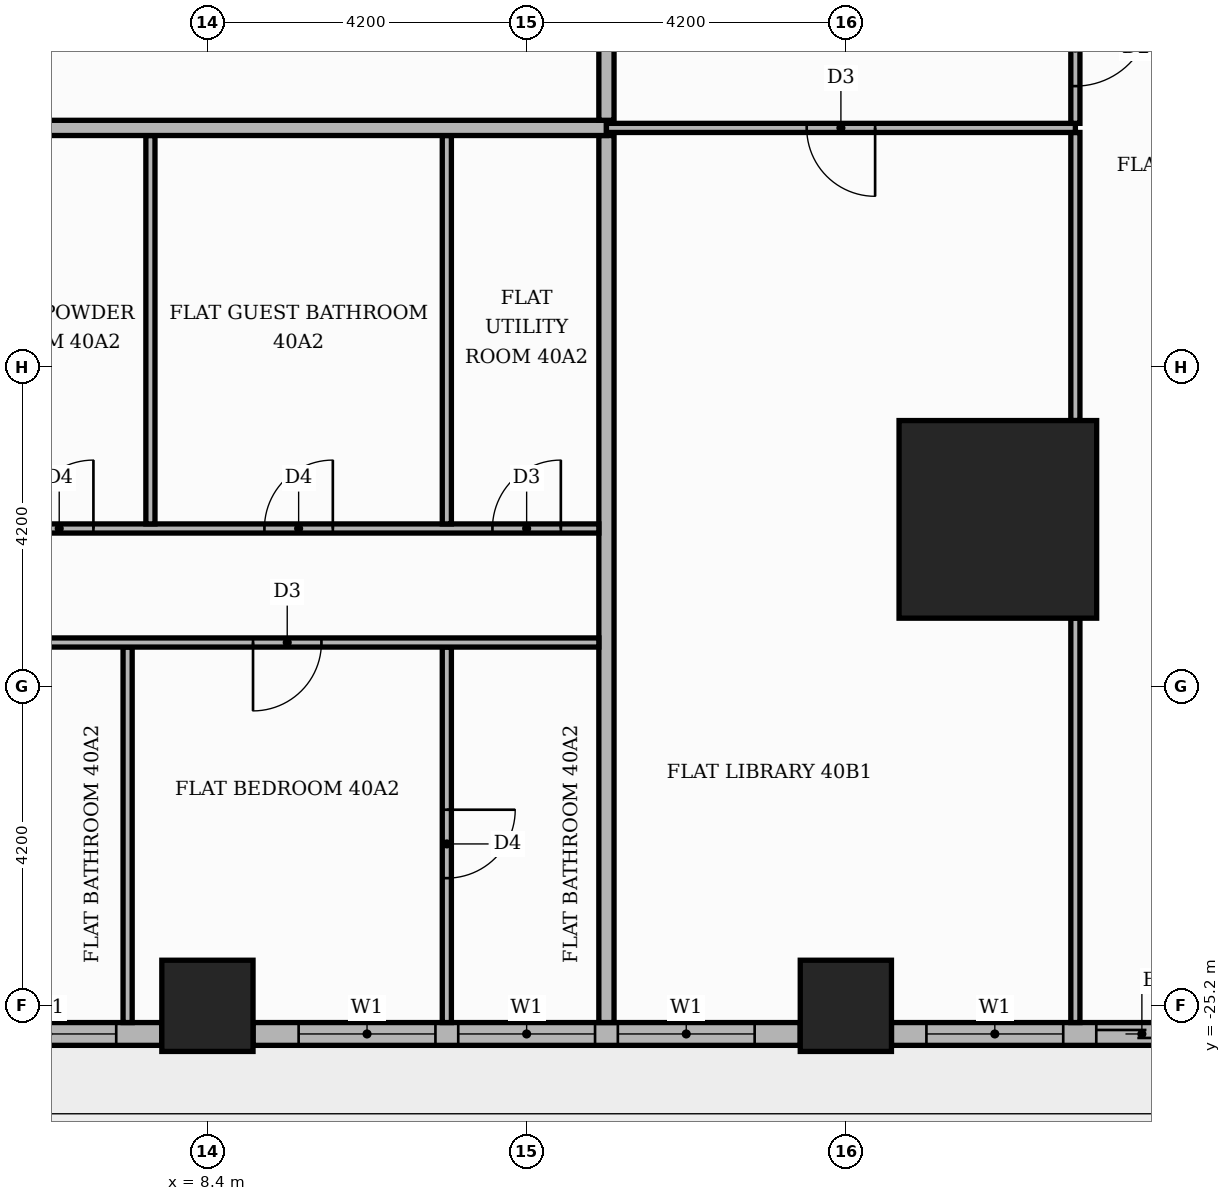
"""IFC4 building model, lengths in metres.
Left out: names, types, materials, properties, quantities, classifications, styles, units other than length and angle.
Written with IfcOpenShell. Run it as: python <this file> out.ifc"""

import sys

from ifc_helpers import new_model, si_unit, direction, frame, frame_2d, origin, origin_2d, place, context, subcontext, project, spatial, rectangle, extrude, element, fill, save


model = new_model("IFC4")
c1 = context("Model", 3, precision=1e-05, world=origin(), true_north=direction((0.0, 1.0)))
c2 = subcontext(c1, "Body", "Model", "MODEL_VIEW")
j1 = project(units=[si_unit("LENGTHUNIT", "METRE"), si_unit("PLANEANGLEUNIT", "RADIAN")], contexts=[c1])
p1 = place(None, origin())
s1 = spatial("IfcSite", under=j1, at=p1, CompositionType="ELEMENT")
p2 = place(p1, origin())
s2 = spatial("IfcBuilding", under=s1, at=p2, CompositionType="ELEMENT")
p3 = place(p2, frame((0.0, 0.0, 168.9)))
s3 = spatial("IfcBuildingStorey", under=s2, at=p3, CompositionType="ELEMENT", Elevation=168.9)
p4 = place(p3, frame((18.8, -18.8, 0.0), z_axis=(0.0, 0.0, 1.0), x_axis=(1.0, 0.0, 0.0)))
e1 = element("IfcColumn", 1, at=p4, inside=s3, PredefinedType="COLUMN", context=c2, shape_type="SweptSolid", body=[
    extrude(rectangle(XDim=2.6, YDim=2.6, at=origin_2d()), origin(), (0.0, 0.0, 1.0), 3.9),
])
for number, where, z_axis, x_axis in (
    (2, (8.4, -25.2, 0.0), (0.0, 0.0, 1.0), (1.0, 0.0, 0.0)),
    (3, (16.8, -25.2, 0.0), (0.0, 0.0, 1.0), (1.0, 0.0, 0.0)),
):
    element("IfcColumn", number, at=place(p3, frame(where, z_axis=z_axis, x_axis=x_axis)), inside=s3, PredefinedType="COLUMN", context=c2, shape_type="SweptSolid", body=[
        extrude(rectangle(XDim=1.2, YDim=1.2, at=origin_2d()), origin(), (0.0, 0.0, 1.0), 3.9),
    ])
p5 = place(p3, frame((0.6, -25.57, 0.0), z_axis=(0.0, 0.0, 1.0), x_axis=(1.0, 0.0, 0.0)))
e4 = element("IfcWall", 4, at=p5, inside=s3, PredefinedType="STANDARD", context=c2, shape_type="SweptSolid", body=[
    extrude(rectangle(XDim=7.2, YDim=0.3, at=frame_2d((3.6, 0.0))), origin(), (0.0, 0.0, 1.0), 3.48),
])
p6 = place(p5, frame((0.6, 0.0, 0.0)))
e5 = element("IfcOpeningElement", 5, at=p6, cuts=e4, PredefinedType="OPENING", context=c2, shape_type="SweptSolid", body=[
    extrude(rectangle(XDim=1.8, YDim=2.4, at=frame_2d((0.9, 1.2))), frame((0.0, 0.16, 0.0), z_axis=(0.0, -1.0, 0.0), x_axis=(1.0, 0.0, 0.0)), (0.0, 0.0, 1.0), 0.32),
])
p7 = place(p5, frame((2.7, 0.0, 0.9)))
e6 = element("IfcOpeningElement", 6, at=p7, cuts=e4, PredefinedType="OPENING", context=c2, shape_type="SweptSolid", body=[
    extrude(rectangle(XDim=1.8, YDim=2.1, at=frame_2d((0.9, 1.05))), frame((0.0, 0.16, 0.0), z_axis=(0.0, -1.0, 0.0), x_axis=(1.0, 0.0, 0.0)), (0.0, 0.0, 1.0), 0.32),
])
p8 = place(p5, frame((4.8, 0.0, 0.9)))
e7 = element("IfcOpeningElement", 7, at=p8, cuts=e4, PredefinedType="OPENING", context=c2, shape_type="SweptSolid", body=[
    extrude(rectangle(XDim=1.8, YDim=2.1, at=frame_2d((0.9, 1.05))), frame((0.0, 0.16, 0.0), z_axis=(0.0, -1.0, 0.0), x_axis=(1.0, 0.0, 0.0)), (0.0, 0.0, 1.0), 0.32),
])
p9 = place(p3, frame((9.0, -25.57, 0.0), z_axis=(0.0, 0.0, 1.0), x_axis=(1.0, 0.0, 0.0)))
e8 = element("IfcWall", 8, at=p9, inside=s3, PredefinedType="STANDARD", context=c2, shape_type="SweptSolid", body=[
    extrude(rectangle(XDim=7.2, YDim=0.3, at=frame_2d((3.6, 0.0))), origin(), (0.0, 0.0, 1.0), 3.48),
])
p10 = place(p9, frame((0.6, 0.0, 0.9)))
e9 = element("IfcOpeningElement", 9, at=p10, cuts=e8, PredefinedType="OPENING", context=c2, shape_type="SweptSolid", body=[
    extrude(rectangle(XDim=1.8, YDim=2.1, at=frame_2d((0.9, 1.05))), frame((0.0, 0.16, 0.0), z_axis=(0.0, -1.0, 0.0), x_axis=(1.0, 0.0, 0.0)), (0.0, 0.0, 1.0), 0.32),
])
p11 = place(p9, frame((2.7, 0.0, 0.9)))
e10 = element("IfcOpeningElement", 10, at=p11, cuts=e8, PredefinedType="OPENING", context=c2, shape_type="SweptSolid", body=[
    extrude(rectangle(XDim=1.8, YDim=2.1, at=frame_2d((0.9, 1.05))), frame((0.0, 0.16, 0.0), z_axis=(0.0, -1.0, 0.0), x_axis=(1.0, 0.0, 0.0)), (0.0, 0.0, 1.0), 0.32),
])
p12 = place(p9, frame((4.8, 0.0, 0.9)))
e11 = element("IfcOpeningElement", 11, at=p12, cuts=e8, PredefinedType="OPENING", context=c2, shape_type="SweptSolid", body=[
    extrude(rectangle(XDim=1.8, YDim=2.1, at=frame_2d((0.9, 1.05))), frame((0.0, 0.16, 0.0), z_axis=(0.0, -1.0, 0.0), x_axis=(1.0, 0.0, 0.0)), (0.0, 0.0, 1.0), 0.32),
])
p13 = place(p3, frame((17.4, -25.57, 0.0), z_axis=(0.0, 0.0, 1.0), x_axis=(1.0, 0.0, 0.0)))
e12 = element("IfcWall", 12, at=p13, inside=s3, PredefinedType="STANDARD", context=c2, shape_type="SweptSolid", body=[
    extrude(rectangle(XDim=4.32, YDim=0.3, at=frame_2d((2.16, 0.0))), origin(), (0.0, 0.0, 1.0), 3.48),
])
p14 = place(p13, frame((2.695, 0.0, 0.0)))
e13 = element("IfcOpeningElement", 13, at=p14, cuts=e12, PredefinedType="OPENING", context=c2, shape_type="SweptSolid", body=[
    extrude(rectangle(XDim=1.2, YDim=2.4, at=frame_2d((0.6, 1.2))), frame((0.0, 0.16, 0.0), z_axis=(0.0, -1.0, 0.0), x_axis=(1.0, 0.0, 0.0)), (0.0, 0.0, 1.0), 0.32),
])
p15 = place(p13, frame((0.46, 0.0, 0.9)))
e14 = element("IfcOpeningElement", 14, at=p15, cuts=e12, PredefinedType="OPENING", context=c2, shape_type="SweptSolid", body=[
    extrude(rectangle(XDim=1.8, YDim=2.1, at=frame_2d((0.9, 1.05))), frame((0.0, 0.16, 0.0), z_axis=(0.0, -1.0, 0.0), x_axis=(1.0, 0.0, 0.0)), (0.0, 0.0, 1.0), 0.32),
])
p16 = place(p3, frame((7.35, -25.42, 0.0), z_axis=(0.0, 0.0, 1.0), x_axis=(0.0, 1.0, 0.0)))
e15 = element("IfcWall", 15, at=p16, inside=s3, PredefinedType="PARTITIONING", context=c2, shape_type="SweptSolid", body=[
    extrude(rectangle(XDim=4.94, YDim=0.12, at=frame_2d((2.47, 0.0))), origin(), (0.0, 0.0, 1.0), 3.48),
])
p17 = place(p3, frame((11.55, -25.42, 0.0), z_axis=(0.0, 0.0, 1.0), x_axis=(0.0, 1.0, 0.0)))
e16 = element("IfcWall", 16, at=p17, inside=s3, PredefinedType="PARTITIONING", context=c2, shape_type="SweptSolid", body=[
    extrude(rectangle(XDim=4.94, YDim=0.12, at=frame_2d((2.47, 0.0))), origin(), (0.0, 0.0, 1.0), 3.48),
])
p18 = place(p17, frame((1.9, 0.0, 0.0)))
e17 = element("IfcOpeningElement", 17, at=p18, cuts=e16, PredefinedType="OPENING", context=c2, shape_type="SweptSolid", body=[
    extrude(rectangle(XDim=0.9, YDim=2.1, at=frame_2d((0.45, 1.05))), frame((0.0, 0.07, 0.0), z_axis=(0.0, -1.0, 0.0), x_axis=(1.0, 0.0, 0.0)), (0.0, 0.0, 1.0), 0.14),
])
p19 = place(p3, frame((13.65, -25.42, 0.0), z_axis=(0.0, 0.0, 1.0), x_axis=(0.0, 1.0, 0.0)))
e18 = element("IfcWall", 18, at=p19, inside=s3, PredefinedType="PARTITIONING", context=c2, shape_type="SweptSolid", body=[
    extrude(rectangle(XDim=11.67, YDim=0.2, at=frame_2d((5.835, 0.0))), origin(), (0.0, 0.0, 1.0), 3.48),
])
p20 = place(p3, frame((19.82, -25.42, 0.0), z_axis=(0.0, 0.0, 1.0), x_axis=(0.0, 1.0, 0.0)))
e19 = element("IfcWall", 19, at=p20, inside=s3, PredefinedType="PARTITIONING", context=c2, shape_type="SweptSolid", body=[
    extrude(rectangle(XDim=5.32, YDim=0.12, at=frame_2d((2.66, 0.0))), origin(), (0.0, 0.0, 1.0), 3.48),
])
p21 = place(p3, frame((-5.15, -20.42, 0.0), z_axis=(0.0, 0.0, 1.0), x_axis=(1.0, 0.0, 0.0)))
e20 = element("IfcWall", 20, at=p21, inside=s3, PredefinedType="PARTITIONING", context=c2, shape_type="SweptSolid", body=[
    extrude(rectangle(XDim=18.7, YDim=0.12, at=frame_2d((9.35, 0.0))), origin(), (0.0, 0.0, 1.0), 3.48),
])
p22 = place(p21, frame((1.5, 0.0, 0.0)))
e21 = element("IfcOpeningElement", 21, at=p22, cuts=e20, PredefinedType="OPENING", context=c2, shape_type="SweptSolid", body=[
    extrude(rectangle(XDim=1.0, YDim=2.1, at=frame_2d((0.5, 1.05))), frame((0.0, 0.07, 0.0), z_axis=(0.0, -1.0, 0.0), x_axis=(1.0, 0.0, 0.0)), (0.0, 0.0, 1.0), 0.14),
])
p23 = place(p21, frame((5.75, 0.0, 0.0)))
e22 = element("IfcOpeningElement", 22, at=p23, cuts=e20, PredefinedType="OPENING", context=c2, shape_type="SweptSolid", body=[
    extrude(rectangle(XDim=0.9, YDim=2.1, at=frame_2d((0.45, 1.05))), frame((0.0, 0.07, 0.0), z_axis=(0.0, -1.0, 0.0), x_axis=(1.0, 0.0, 0.0)), (0.0, 0.0, 1.0), 0.14),
])
p24 = place(p21, frame((14.15, 0.0, 0.0)))
e23 = element("IfcOpeningElement", 23, at=p24, cuts=e20, PredefinedType="OPENING", context=c2, shape_type="SweptSolid", body=[
    extrude(rectangle(XDim=0.9, YDim=2.1, at=frame_2d((0.45, 1.05))), frame((0.0, 0.07, 0.0), z_axis=(0.0, -1.0, 0.0), x_axis=(1.0, 0.0, 0.0)), (0.0, 0.0, 1.0), 0.14),
])
p25 = place(p3, frame((-1.05, -18.92, 0.0), z_axis=(0.0, 0.0, 1.0), x_axis=(1.0, 0.0, 0.0)))
e24 = element("IfcWall", 24, at=p25, inside=s3, PredefinedType="PARTITIONING", context=c2, shape_type="SweptSolid", body=[
    extrude(rectangle(XDim=14.6, YDim=0.12, at=frame_2d((7.3, 0.0))), origin(), (0.0, 0.0, 1.0), 3.48),
])
p26 = place(p25, frame((2.7, 0.0, 0.0)))
e25 = element("IfcOpeningElement", 25, at=p26, cuts=e24, PredefinedType="OPENING", context=c2, shape_type="SweptSolid", body=[
    extrude(rectangle(XDim=0.9, YDim=2.1, at=frame_2d((0.45, 1.05))), frame((0.0, 0.07, 0.0), z_axis=(0.0, -1.0, 0.0), x_axis=(1.0, 0.0, 0.0)), (0.0, 0.0, 1.0), 0.14),
])
p27 = place(p25, frame((7.05, 0.0, 0.0)))
e26 = element("IfcOpeningElement", 26, at=p27, cuts=e24, PredefinedType="OPENING", context=c2, shape_type="SweptSolid", body=[
    extrude(rectangle(XDim=0.9, YDim=2.1, at=frame_2d((0.45, 1.05))), frame((0.0, 0.07, 0.0), z_axis=(0.0, -1.0, 0.0), x_axis=(1.0, 0.0, 0.0)), (0.0, 0.0, 1.0), 0.14),
])
p28 = place(p25, frame((10.2, 0.0, 0.0)))
e27 = element("IfcOpeningElement", 27, at=p28, cuts=e24, PredefinedType="OPENING", context=c2, shape_type="SweptSolid", body=[
    extrude(rectangle(XDim=0.9, YDim=2.1, at=frame_2d((0.45, 1.05))), frame((0.0, 0.07, 0.0), z_axis=(0.0, -1.0, 0.0), x_axis=(1.0, 0.0, 0.0)), (0.0, 0.0, 1.0), 0.14),
])
p29 = place(p25, frame((13.2, 0.0, 0.0)))
e28 = element("IfcOpeningElement", 28, at=p29, cuts=e24, PredefinedType="OPENING", context=c2, shape_type="SweptSolid", body=[
    extrude(rectangle(XDim=0.9, YDim=2.1, at=frame_2d((0.45, 1.05))), frame((0.0, 0.07, 0.0), z_axis=(0.0, -1.0, 0.0), x_axis=(1.0, 0.0, 0.0)), (0.0, 0.0, 1.0), 0.14),
])
for number, where, z_axis, x_axis in (
    (29, (7.65, -18.86, 0.0), (0.0, 0.0, 1.0), (0.0, 1.0, 0.0)),
    (30, (11.55, -18.86, 0.0), (0.0, 0.0, 1.0), (0.0, 1.0, 0.0)),
):
    element("IfcWall", number, at=place(p3, frame(where, z_axis=z_axis, x_axis=x_axis)), inside=s3, PredefinedType="PARTITIONING", context=c2, shape_type="SweptSolid", body=[
        extrude(rectangle(XDim=5.11, YDim=0.12, at=frame_2d((2.555, 0.0))), origin(), (0.0, 0.0, 1.0), 3.48),
    ])
p30 = place(p3, frame((19.82, -17.5, 0.0), z_axis=(0.0, 0.0, 1.0), x_axis=(0.0, 1.0, 0.0)))
e31 = element("IfcWall", 31, at=p30, inside=s3, PredefinedType="PARTITIONING", context=c2, shape_type="SweptSolid", body=[
    extrude(rectangle(XDim=3.79, YDim=0.12, at=frame_2d((1.895, 0.0))), origin(), (0.0, 0.0, 1.0), 3.48),
])
p31 = place(p3, frame((-25.42, -13.65, 0.0), z_axis=(0.0, 0.0, 1.0), x_axis=(1.0, 0.0, 0.0)))
e32 = element("IfcWall", 32, at=p31, inside=s3, PredefinedType="PARTITIONING", context=c2, shape_type="SweptSolid", body=[
    extrude(rectangle(XDim=39.07, YDim=0.2, at=frame_2d((19.535, 0.0))), origin(), (0.0, 0.0, 1.0), 3.48),
])
p32 = place(p31, frame((13.32, 0.0, 0.0)))
e33 = element("IfcOpeningElement", 33, at=p32, cuts=e32, PredefinedType="OPENING", context=c2, shape_type="SweptSolid", body=[
    extrude(rectangle(XDim=1.1, YDim=2.4, at=frame_2d((0.55, 1.2))), frame((0.0, 0.11, 0.0), z_axis=(0.0, -1.0, 0.0), x_axis=(1.0, 0.0, 0.0)), (0.0, 0.0, 1.0), 0.22),
])
p33 = place(p31, frame((21.72, 0.0, 0.0)))
e34 = element("IfcOpeningElement", 34, at=p33, cuts=e32, PredefinedType="OPENING", context=c2, shape_type="SweptSolid", body=[
    extrude(rectangle(XDim=1.1, YDim=2.4, at=frame_2d((0.55, 1.2))), frame((0.0, 0.11, 0.0), z_axis=(0.0, -1.0, 0.0), x_axis=(1.0, 0.0, 0.0)), (0.0, 0.0, 1.0), 0.22),
])
p34 = place(p3, frame((13.65, -13.65, 0.0), z_axis=(0.0, 0.0, 1.0), x_axis=(1.0, 0.0, 0.0)))
e35 = element("IfcWall", 35, at=p34, inside=s3, PredefinedType="PARTITIONING", context=c2, shape_type="SweptSolid", body=[
    extrude(rectangle(XDim=6.17, YDim=0.12, at=frame_2d((3.085, 0.0))), origin(), (0.0, 0.0, 1.0), 3.48),
])
p35 = place(p34, frame((2.635, 0.0, 0.0)))
e36 = element("IfcOpeningElement", 36, at=p35, cuts=e35, PredefinedType="OPENING", context=c2, shape_type="SweptSolid", body=[
    extrude(rectangle(XDim=0.9, YDim=2.1, at=frame_2d((0.45, 1.05))), frame((0.0, 0.07, 0.0), z_axis=(0.0, -1.0, 0.0), x_axis=(1.0, 0.0, 0.0)), (0.0, 0.0, 1.0), 0.14),
])
p36 = place(p3, frame((19.82, -13.59, 0.0), z_axis=(0.0, 0.0, 1.0), x_axis=(0.0, 1.0, 0.0)))
e37 = element("IfcWall", 37, at=p36, inside=s3, PredefinedType="PARTITIONING", context=c2, shape_type="SweptSolid", body=[
    extrude(rectangle(XDim=1.98, YDim=0.12, at=frame_2d((0.99, 0.0))), origin(), (0.0, 0.0, 1.0), 3.48),
])
p37 = place(p36, frame((0.49, 0.0, 0.0)))
e38 = element("IfcOpeningElement", 38, at=p37, cuts=e37, PredefinedType="OPENING", context=c2, shape_type="SweptSolid", body=[
    extrude(rectangle(XDim=1.0, YDim=2.1, at=frame_2d((0.5, 1.05))), frame((0.0, 0.07, 0.0), z_axis=(0.0, -1.0, 0.0), x_axis=(1.0, 0.0, 0.0)), (0.0, 0.0, 1.0), 0.14),
])
p38 = place(p3, frame((13.65, -13.55, 0.0), z_axis=(0.0, 0.0, 1.0), x_axis=(0.0, 1.0, 0.0)))
e39 = element("IfcWall", 39, at=p38, inside=s3, PredefinedType="PARTITIONING", context=c2, shape_type="SweptSolid", body=[
    extrude(rectangle(XDim=2.45, YDim=0.2, at=frame_2d((1.225, 0.0))), origin(), (0.0, 0.0, 1.0), 3.48),
])
p39 = place(p8, origin())
e40 = element("IfcWindow", 40, at=p39, inside=s3, PartitioningType="SINGLE_PANEL", PredefinedType="WINDOW", context=c2, shape_type="SweptSolid", body=[
    extrude(rectangle(XDim=1.8, YDim=2.1, at=frame_2d((0.9, 1.05))), frame((0.0, 0.03, 0.0), z_axis=(0.0, -1.0, 0.0), x_axis=(1.0, 0.0, 0.0)), (0.0, 0.0, 1.0), 0.06),
])
fill(e7, e40)
p40 = place(p10, origin())
e41 = element("IfcWindow", 41, at=p40, inside=s3, PartitioningType="SINGLE_PANEL", PredefinedType="WINDOW", context=c2, shape_type="SweptSolid", body=[
    extrude(rectangle(XDim=1.8, YDim=2.1, at=frame_2d((0.9, 1.05))), frame((0.0, 0.03, 0.0), z_axis=(0.0, -1.0, 0.0), x_axis=(1.0, 0.0, 0.0)), (0.0, 0.0, 1.0), 0.06),
])
fill(e9, e41)
p41 = place(p11, origin())
e42 = element("IfcWindow", 42, at=p41, inside=s3, PartitioningType="SINGLE_PANEL", PredefinedType="WINDOW", context=c2, shape_type="SweptSolid", body=[
    extrude(rectangle(XDim=1.8, YDim=2.1, at=frame_2d((0.9, 1.05))), frame((0.0, 0.03, 0.0), z_axis=(0.0, -1.0, 0.0), x_axis=(1.0, 0.0, 0.0)), (0.0, 0.0, 1.0), 0.06),
])
fill(e10, e42)
p42 = place(p12, origin())
e43 = element("IfcWindow", 43, at=p42, inside=s3, PartitioningType="SINGLE_PANEL", PredefinedType="WINDOW", context=c2, shape_type="SweptSolid", body=[
    extrude(rectangle(XDim=1.8, YDim=2.1, at=frame_2d((0.9, 1.05))), frame((0.0, 0.03, 0.0), z_axis=(0.0, -1.0, 0.0), x_axis=(1.0, 0.0, 0.0)), (0.0, 0.0, 1.0), 0.06),
])
fill(e11, e43)
p43 = place(p14, origin())
e44 = element("IfcDoor", 44, at=p43, inside=s3, OperationType="SLIDING_TO_LEFT", PredefinedType="DOOR", context=c2, shape_type="SweptSolid", body=[
    extrude(rectangle(XDim=1.2, YDim=2.4, at=frame_2d((0.6, 1.2))), frame((0.0, 0.025, 0.0), z_axis=(0.0, -1.0, 0.0), x_axis=(1.0, 0.0, 0.0)), (0.0, 0.0, 1.0), 0.05),
])
fill(e13, e44)
p44 = place(p15, origin())
e45 = element("IfcWindow", 45, at=p44, inside=s3, PartitioningType="SINGLE_PANEL", PredefinedType="WINDOW", context=c2, shape_type="SweptSolid", body=[
    extrude(rectangle(XDim=1.8, YDim=2.1, at=frame_2d((0.9, 1.05))), frame((0.0, 0.03, 0.0), z_axis=(0.0, -1.0, 0.0), x_axis=(1.0, 0.0, 0.0)), (0.0, 0.0, 1.0), 0.06),
])
fill(e14, e45)
p45 = place(p27, origin())
e46 = element("IfcDoor", 46, at=p45, inside=s3, OperationType="SINGLE_SWING_RIGHT", PredefinedType="DOOR", context=c2, shape_type="SweptSolid", body=[
    extrude(rectangle(XDim=0.9, YDim=2.1, at=frame_2d((0.45, 1.05))), frame((0.0, 0.025, 0.0), z_axis=(0.0, -1.0, 0.0), x_axis=(1.0, 0.0, 0.0)), (0.0, 0.0, 1.0), 0.05),
])
fill(e26, e46)
p46 = place(p28, origin())
e47 = element("IfcDoor", 47, at=p46, inside=s3, OperationType="SINGLE_SWING_RIGHT", PredefinedType="DOOR", context=c2, shape_type="SweptSolid", body=[
    extrude(rectangle(XDim=0.9, YDim=2.1, at=frame_2d((0.45, 1.05))), frame((0.0, 0.025, 0.0), z_axis=(0.0, -1.0, 0.0), x_axis=(1.0, 0.0, 0.0)), (0.0, 0.0, 1.0), 0.05),
])
fill(e27, e47)
p47 = place(p29, origin())
e48 = element("IfcDoor", 48, at=p47, inside=s3, OperationType="SINGLE_SWING_RIGHT", PredefinedType="DOOR", context=c2, shape_type="SweptSolid", body=[
    extrude(rectangle(XDim=0.9, YDim=2.1, at=frame_2d((0.45, 1.05))), frame((0.0, 0.025, 0.0), z_axis=(0.0, -1.0, 0.0), x_axis=(1.0, 0.0, 0.0)), (0.0, 0.0, 1.0), 0.05),
])
fill(e28, e48)
p48 = place(p24, frame((0.9, 0.0, 0.0), z_axis=(0.0, 0.0, 1.0), x_axis=(-1.0, 0.0, 0.0)))
e49 = element("IfcDoor", 49, at=p48, inside=s3, OperationType="SINGLE_SWING_LEFT", PredefinedType="DOOR", context=c2, shape_type="SweptSolid", body=[
    extrude(rectangle(XDim=0.9, YDim=2.1, at=frame_2d((0.45, 1.05))), frame((0.0, 0.025, 0.0), z_axis=(0.0, -1.0, 0.0), x_axis=(1.0, 0.0, 0.0)), (0.0, 0.0, 1.0), 0.05),
])
fill(e23, e49)
p49 = place(p18, frame((0.9, 0.0, 0.0), z_axis=(0.0, 0.0, 1.0), x_axis=(-1.0, 0.0, 0.0)))
e50 = element("IfcDoor", 50, at=p49, inside=s3, OperationType="SINGLE_SWING_RIGHT", PredefinedType="DOOR", context=c2, shape_type="SweptSolid", body=[
    extrude(rectangle(XDim=0.9, YDim=2.1, at=frame_2d((0.45, 1.05))), frame((0.0, 0.025, 0.0), z_axis=(0.0, -1.0, 0.0), x_axis=(1.0, 0.0, 0.0)), (0.0, 0.0, 1.0), 0.05),
])
fill(e17, e50)
p50 = place(p35, frame((0.9, 0.0, 0.0), z_axis=(0.0, 0.0, 1.0), x_axis=(-1.0, 0.0, 0.0)))
e51 = element("IfcDoor", 51, at=p50, inside=s3, OperationType="SINGLE_SWING_RIGHT", PredefinedType="DOOR", context=c2, shape_type="SweptSolid", body=[
    extrude(rectangle(XDim=0.9, YDim=2.1, at=frame_2d((0.45, 1.05))), frame((0.0, 0.025, 0.0), z_axis=(0.0, -1.0, 0.0), x_axis=(1.0, 0.0, 0.0)), (0.0, 0.0, 1.0), 0.05),
])
fill(e36, e51)
p51 = place(p37, frame((1.0, 0.0, 0.0), z_axis=(0.0, 0.0, 1.0), x_axis=(-1.0, 0.0, 0.0)))
e52 = element("IfcDoor", 52, at=p51, inside=s3, OperationType="SINGLE_SWING_RIGHT", PredefinedType="DOOR", context=c2, shape_type="SweptSolid", body=[
    extrude(rectangle(XDim=1.0, YDim=2.1, at=frame_2d((0.5, 1.05))), frame((0.0, 0.025, 0.0), z_axis=(0.0, -1.0, 0.0), x_axis=(1.0, 0.0, 0.0)), (0.0, 0.0, 1.0), 0.05),
])
fill(e38, e52)
save(model, sys.argv[1])
